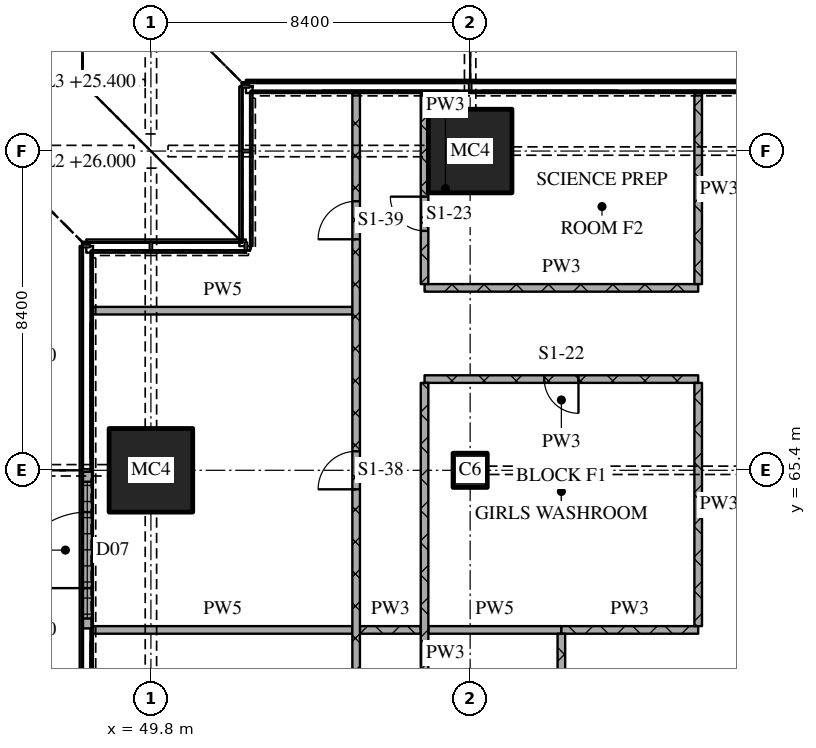
"""IFC4 building model, lengths in metres.
Left out: names, types, materials, properties, quantities, classifications, styles, units other than length and angle.
Written with IfcOpenShell. Run it as: python <this file> out.ifc"""

import sys

from ifc_helpers import new_model, si_unit, direction, frame, frame_2d, origin, origin_2d, place, context, subcontext, project, spatial, rectangle, extrude, element, fill, save


model = new_model("IFC4")
c1 = context("Model", 3, precision=1e-05, world=origin(), true_north=direction((0.0, 1.0)))
c2 = subcontext(c1, "Body", "Model", "MODEL_VIEW")
j1 = project(units=[si_unit("LENGTHUNIT", "METRE"), si_unit("PLANEANGLEUNIT", "RADIAN")], contexts=[c1])
p1 = place(None, origin())
s1 = spatial("IfcSite", under=j1, at=p1, CompositionType="ELEMENT")
p2 = place(p1, origin())
s2 = spatial("IfcBuilding", under=s1, at=p2, CompositionType="ELEMENT")
p3 = place(p2, frame((0.0, 0.0, 19.2)))
s3 = spatial("IfcBuildingStorey", under=s2, at=p3, CompositionType="ELEMENT", Elevation=19.2)
p4 = place(p3, frame((49.8, 65.4, 0.0), z_axis=(0.0, 0.0, 1.0), x_axis=(1.0, 0.0, 0.0)))
e1 = element("IfcColumn", 1, at=p4, inside=s3, PredefinedType="COLUMN", context=c2, shape_type="SweptSolid", body=[
    extrude(rectangle(XDim=2.2, YDim=2.2, at=origin_2d()), origin(), (0.0, 0.0, 1.0), 4.5),
])
p5 = place(p3, frame((58.2, 65.4, 0.0), z_axis=(0.0, 0.0, 1.0), x_axis=(1.0, 0.0, 0.0)))
e2 = element("IfcColumn", 2, at=p5, inside=s3, PredefinedType="COLUMN", context=c2, shape_type="SweptSolid", body=[
    extrude(rectangle(XDim=0.9, YDim=0.9, at=origin_2d()), origin(), (0.0, 0.0, 1.0), 4.5),
])
p6 = place(p3, frame((58.2, 73.8, 0.0), z_axis=(0.0, 0.0, 1.0), x_axis=(1.0, 0.0, 0.0)))
e3 = element("IfcColumn", 3, at=p6, inside=s3, PredefinedType="COLUMN", context=c2, shape_type="SweptSolid", body=[
    extrude(rectangle(XDim=2.2, YDim=2.2, at=origin_2d()), origin(), (0.0, 0.0, 1.0), 4.5),
])
p7 = place(p3, frame((48.125, 61.24, 0.0), z_axis=(0.0, 0.0, 1.0), x_axis=(0.0, 1.0, 0.0)))
e4 = element("IfcWall", 4, at=p7, inside=s3, PredefinedType="SOLIDWALL", context=c2, shape_type="SweptSolid", body=[
    extrude(rectangle(XDim=4.12, YDim=0.25, at=frame_2d((2.06, 0.0))), origin(), (0.0, 0.0, 1.0), 4.2),
])
p8 = place(p7, frame((1.06, 0.0, 0.0)))
e5 = element("IfcOpeningElement", 5, at=p8, cuts=e4, PredefinedType="OPENING", context=c2, shape_type="SweptSolid", body=[
    extrude(rectangle(XDim=2.0, YDim=2.4, at=frame_2d((1.0, 1.2))), frame((0.0, 0.135, 0.0), z_axis=(0.0, -1.0, 0.0), x_axis=(1.0, 0.0, 0.0)), (0.0, 0.0, 1.0), 0.27),
])
p9 = place(p7, frame((0.26, 0.0, 2.7)))
e6 = element("IfcOpeningElement", 6, at=p9, cuts=e4, PredefinedType="OPENING", context=c2, shape_type="SweptSolid", body=[
    extrude(rectangle(XDim=3.6, YDim=1.1, at=frame_2d((1.8, 0.55))), frame((0.0, 0.135, 0.0), z_axis=(0.0, -1.0, 0.0), x_axis=(1.0, 0.0, 0.0)), (0.0, 0.0, 1.0), 0.27),
])
p10 = place(p3, frame((55.3, 61.2, 0.0), z_axis=(0.0, 0.0, 1.0), x_axis=(1.0, 0.0, 0.0)))
e7 = element("IfcWall", 7, at=p10, inside=s3, PredefinedType="PARTITIONING", context=c2, shape_type="SweptSolid", body=[
    extrude(rectangle(XDim=1.6, YDim=0.2, at=frame_2d((0.8, 0.0))), origin(), (0.0, 0.0, 1.0), 4.2),
])
p11 = place(p3, frame((60.6, 61.2, 0.0), z_axis=(0.0, 0.0, 1.0), x_axis=(1.0, 0.0, 0.0)))
e8 = element("IfcWall", 8, at=p11, inside=s3, PredefinedType="PARTITIONING", context=c2, shape_type="SweptSolid", body=[
    extrude(rectangle(XDim=3.6, YDim=0.2, at=frame_2d((1.8, 0.0))), origin(), (0.0, 0.0, 1.0), 4.2),
])
p12 = place(p3, frame((48.28, 61.2, 0.0), z_axis=(0.0, 0.0, 1.0), x_axis=(1.0, 0.0, 0.0)))
e9 = element("IfcWall", 9, at=p12, inside=s3, PredefinedType="PARTITIONING", context=c2, shape_type="SweptSolid", body=[
    extrude(rectangle(XDim=6.82, YDim=0.2, at=frame_2d((3.41, 0.0))), origin(), (0.0, 0.0, 1.0), 4.2),
])
p13 = place(p3, frame((57.1, 61.2, 0.0), z_axis=(0.0, 0.0, 1.0), x_axis=(1.0, 0.0, 0.0)))
e10 = element("IfcWall", 10, at=p13, inside=s3, PredefinedType="PARTITIONING", context=c2, shape_type="SweptSolid", body=[
    extrude(rectangle(XDim=3.5, YDim=0.2, at=frame_2d((1.75, 0.0))), origin(), (0.0, 0.0, 1.0), 4.2),
])
p14 = place(p3, frame((64.2, 67.8, 0.0), z_axis=(0.0, 0.0, 1.0), x_axis=(-1.0, 0.0, 0.0)))
e11 = element("IfcWall", 11, at=p14, inside=s3, PredefinedType="PARTITIONING", context=c2, shape_type="SweptSolid", body=[
    extrude(rectangle(XDim=7.2, YDim=0.2, at=frame_2d((3.6, 0.0))), origin(), (0.0, 0.0, 1.0), 4.2),
])
p15 = place(p14, frame((3.15, 0.0, 0.0)))
e12 = element("IfcOpeningElement", 12, at=p15, cuts=e11, PredefinedType="OPENING", context=c2, shape_type="SweptSolid", body=[
    extrude(rectangle(XDim=0.9, YDim=2.1, at=frame_2d((0.45, 1.05))), frame((0.0, 0.11, 0.0), z_axis=(0.0, -1.0, 0.0), x_axis=(1.0, 0.0, 0.0)), (0.0, 0.0, 1.0), 0.22),
])
p16 = place(p3, frame((48.28, 69.6, 0.0), z_axis=(0.0, 0.0, 1.0), x_axis=(1.0, 0.0, 0.0)))
e13 = element("IfcWall", 13, at=p16, inside=s3, PredefinedType="PARTITIONING", context=c2, shape_type="SweptSolid", body=[
    extrude(rectangle(XDim=6.82, YDim=0.2, at=frame_2d((3.41, 0.0))), origin(), (0.0, 0.0, 1.0), 4.2),
])
p17 = place(p3, frame((57.0, 70.2, 0.0), z_axis=(0.0, 0.0, 1.0), x_axis=(1.0, 0.0, 0.0)))
e14 = element("IfcWall", 14, at=p17, inside=s3, PredefinedType="PARTITIONING", context=c2, shape_type="SweptSolid", body=[
    extrude(rectangle(XDim=7.2, YDim=0.2, at=frame_2d((3.6, 0.0))), origin(), (0.0, 0.0, 1.0), 4.2),
])
p18 = place(p3, frame((55.2, 43.3, 0.0), z_axis=(0.0, 0.0, 1.0), x_axis=(0.0, 1.0, 0.0)))
e15 = element("IfcWall", 15, at=p18, inside=s3, PredefinedType="PARTITIONING", context=c2, shape_type="SweptSolid", body=[
    extrude(rectangle(XDim=32.02, YDim=0.2, at=frame_2d((16.01, 0.0))), origin(), (0.0, 0.0, 1.0), 4.2),
])
p19 = place(p18, frame((8.4, 0.0, 0.0)))
e16 = element("IfcOpeningElement", 16, at=p19, cuts=e15, PredefinedType="OPENING", context=c2, shape_type="SweptSolid", body=[
    extrude(rectangle(XDim=1.0, YDim=2.1, at=frame_2d((0.5, 1.05))), frame((0.0, 0.11, 0.0), z_axis=(0.0, -1.0, 0.0), x_axis=(1.0, 0.0, 0.0)), (0.0, 0.0, 1.0), 0.22),
])
p20 = place(p18, frame((21.6, 0.0, 0.0)))
e17 = element("IfcOpeningElement", 17, at=p20, cuts=e15, PredefinedType="OPENING", context=c2, shape_type="SweptSolid", body=[
    extrude(rectangle(XDim=1.0, YDim=2.1, at=frame_2d((0.5, 1.05))), frame((0.0, 0.11, 0.0), z_axis=(0.0, -1.0, 0.0), x_axis=(1.0, 0.0, 0.0)), (0.0, 0.0, 1.0), 0.22),
])
p21 = place(p18, frame((28.179, 0.0, 0.0)))
e18 = element("IfcOpeningElement", 18, at=p21, cuts=e15, PredefinedType="OPENING", context=c2, shape_type="SweptSolid", body=[
    extrude(rectangle(XDim=1.0, YDim=2.1, at=frame_2d((0.5, 1.05))), frame((0.0, 0.11, 0.0), z_axis=(0.0, -1.0, 0.0), x_axis=(1.0, 0.0, 0.0)), (0.0, 0.0, 1.0), 0.22),
])
p22 = place(p3, frame((57.0, 67.7, 0.0), z_axis=(0.0, 0.0, 1.0), x_axis=(0.0, -1.0, 0.0)))
e19 = element("IfcWall", 19, at=p22, inside=s3, PredefinedType="PARTITIONING", context=c2, shape_type="SweptSolid", body=[
    extrude(rectangle(XDim=14.2, YDim=0.2, at=frame_2d((7.1, 0.0))), origin(), (0.0, 0.0, 1.0), 4.2),
])
p23 = place(p22, frame((9.2, 0.0, 0.0)))
e20 = element("IfcOpeningElement", 20, at=p23, cuts=e19, PredefinedType="OPENING", context=c2, shape_type="SweptSolid", body=[
    extrude(rectangle(XDim=0.9, YDim=2.1, at=frame_2d((0.45, 1.05))), frame((0.0, 0.11, 0.0), z_axis=(0.0, -1.0, 0.0), x_axis=(1.0, 0.0, 0.0)), (0.0, 0.0, 1.0), 0.22),
])
p24 = place(p3, frame((57.0, 75.32, 0.0), z_axis=(0.0, 0.0, 1.0), x_axis=(0.0, -1.0, 0.0)))
e21 = element("IfcWall", 21, at=p24, inside=s3, PredefinedType="PARTITIONING", context=c2, shape_type="SweptSolid", body=[
    extrude(rectangle(XDim=5.02, YDim=0.2, at=frame_2d((2.51, 0.0))), origin(), (0.0, 0.0, 1.0), 4.2),
])
p25 = place(p24, frame((2.72, 0.0, 0.0)))
e22 = element("IfcOpeningElement", 22, at=p25, cuts=e21, PredefinedType="OPENING", context=c2, shape_type="SweptSolid", body=[
    extrude(rectangle(XDim=0.9, YDim=2.1, at=frame_2d((0.45, 1.05))), frame((0.0, 0.11, 0.0), z_axis=(0.0, -1.0, 0.0), x_axis=(1.0, 0.0, 0.0)), (0.0, 0.0, 1.0), 0.22),
])
p26 = place(p3, frame((60.6, 61.1, 0.0), z_axis=(0.0, 0.0, 1.0), x_axis=(0.0, -1.0, 0.0)))
e23 = element("IfcWall", 23, at=p26, inside=s3, PredefinedType="PARTITIONING", context=c2, shape_type="SweptSolid", body=[
    extrude(rectangle(XDim=7.6, YDim=0.2, at=frame_2d((3.8, 0.0))), origin(), (0.0, 0.0, 1.0), 4.2),
])
p27 = place(p3, frame((64.2, 67.7, 0.0), z_axis=(0.0, 0.0, 1.0), x_axis=(0.0, -1.0, 0.0)))
e24 = element("IfcWall", 24, at=p27, inside=s3, PredefinedType="PARTITIONING", context=c2, shape_type="SweptSolid", body=[
    extrude(rectangle(XDim=6.4, YDim=0.2, at=frame_2d((3.2, 0.0))), origin(), (0.0, 0.0, 1.0), 4.2),
])
p28 = place(p3, frame((64.2, 75.32, 0.0), z_axis=(0.0, 0.0, 1.0), x_axis=(0.0, -1.0, 0.0)))
e25 = element("IfcWall", 25, at=p28, inside=s3, PredefinedType="PARTITIONING", context=c2, shape_type="SweptSolid", body=[
    extrude(rectangle(XDim=5.02, YDim=0.2, at=frame_2d((2.51, 0.0))), origin(), (0.0, 0.0, 1.0), 4.2),
])
p29 = place(p8, origin())
e26 = element("IfcDoor", 26, at=p29, inside=s3, OperationType="DOUBLE_DOOR_SINGLE_SWING", PredefinedType="DOOR", context=c2, shape_type="SweptSolid", body=[
    extrude(rectangle(XDim=2.0, YDim=2.4, at=frame_2d((1.0, 1.2))), frame((0.0, 0.025, 0.0), z_axis=(0.0, -1.0, 0.0), x_axis=(1.0, 0.0, 0.0)), (0.0, 0.0, 1.0), 0.05),
])
fill(e5, e26)
p30 = place(p9, origin())
e27 = element("IfcWindow", 27, at=p30, inside=s3, PartitioningType="SINGLE_PANEL", PredefinedType="WINDOW", context=c2, shape_type="SweptSolid", body=[
    extrude(rectangle(XDim=3.6, YDim=1.1, at=frame_2d((1.8, 0.55))), frame((0.0, 0.03, 0.0), z_axis=(0.0, -1.0, 0.0), x_axis=(1.0, 0.0, 0.0)), (0.0, 0.0, 1.0), 0.06),
])
fill(e6, e27)
p31 = place(p15, origin())
e28 = element("IfcDoor", 28, at=p31, inside=s3, OperationType="SINGLE_SWING_LEFT", PredefinedType="DOOR", context=c2, shape_type="SweptSolid", body=[
    extrude(rectangle(XDim=0.9, YDim=2.1, at=frame_2d((0.45, 1.05))), frame((0.0, 0.025, 0.0), z_axis=(0.0, -1.0, 0.0), x_axis=(1.0, 0.0, 0.0)), (0.0, 0.0, 1.0), 0.05),
])
fill(e12, e28)
p32 = place(p20, origin())
e29 = element("IfcDoor", 29, at=p32, inside=s3, OperationType="SINGLE_SWING_LEFT", PredefinedType="DOOR", context=c2, shape_type="SweptSolid", body=[
    extrude(rectangle(XDim=1.0, YDim=2.1, at=frame_2d((0.5, 1.05))), frame((0.0, 0.025, 0.0), z_axis=(0.0, -1.0, 0.0), x_axis=(1.0, 0.0, 0.0)), (0.0, 0.0, 1.0), 0.05),
])
fill(e17, e29)
p33 = place(p21, origin())
e30 = element("IfcDoor", 30, at=p33, inside=s3, OperationType="SINGLE_SWING_LEFT", PredefinedType="DOOR", context=c2, shape_type="SweptSolid", body=[
    extrude(rectangle(XDim=1.0, YDim=2.1, at=frame_2d((0.5, 1.05))), frame((0.0, 0.025, 0.0), z_axis=(0.0, -1.0, 0.0), x_axis=(1.0, 0.0, 0.0)), (0.0, 0.0, 1.0), 0.05),
])
fill(e18, e30)
p34 = place(p25, origin())
e31 = element("IfcDoor", 31, at=p34, inside=s3, OperationType="SINGLE_SWING_RIGHT", PredefinedType="DOOR", context=c2, shape_type="SweptSolid", body=[
    extrude(rectangle(XDim=0.9, YDim=2.1, at=frame_2d((0.45, 1.05))), frame((0.0, 0.025, 0.0), z_axis=(0.0, -1.0, 0.0), x_axis=(1.0, 0.0, 0.0)), (0.0, 0.0, 1.0), 0.05),
])
fill(e22, e31)
save(model, sys.argv[1])
